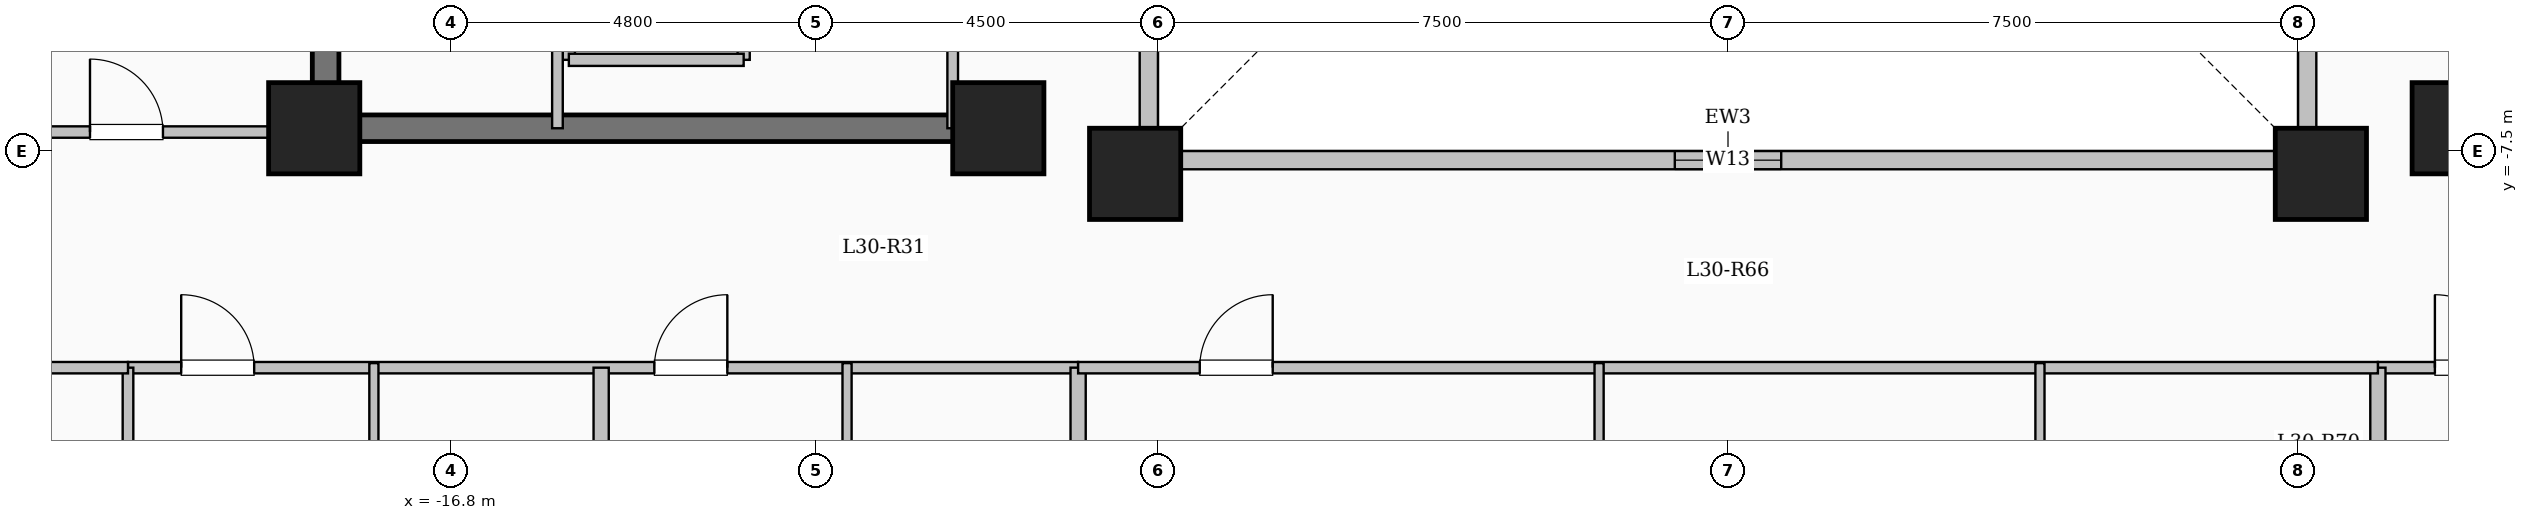
"""IFC4 building model, lengths in metres.
Left out: names, types, materials, properties, quantities, classifications, styles, units other than length and angle.
Written with IfcOpenShell. Run it as: python <this file> out.ifc"""

import sys

from ifc_helpers import new_model, si_unit, direction, frame, frame_2d, origin, origin_2d, place, context, subcontext, project, spatial, rectangle, extrude, element, fill, save


model = new_model("IFC4")
c1 = context("Model", 3, precision=1e-05, world=origin(), true_north=direction((0.0, 1.0)))
c2 = subcontext(c1, "Body", "Model", "MODEL_VIEW")
j1 = project(units=[si_unit("LENGTHUNIT", "METRE"), si_unit("PLANEANGLEUNIT", "RADIAN")], contexts=[c1])
p1 = place(None, origin())
s1 = spatial("IfcSite", under=j1, at=p1, CompositionType="ELEMENT")
p2 = place(p1, origin())
s2 = spatial("IfcBuilding", under=s1, at=p2, CompositionType="ELEMENT")
p3 = place(p2, frame((0.0, 0.0, 111.8)))
s3 = spatial("IfcBuildingStorey", under=s2, at=p3, CompositionType="ELEMENT", Elevation=111.8)
for number, where, z_axis, x_axis in (
    (1, (-7.8, -7.8, 0.0), (0.0, 0.0, 1.0), (1.0, 0.0, 0.0)),
    (2, (7.8, -7.8, 0.0), (0.0, 0.0, 1.0), (1.0, 0.0, 0.0)),
    (3, (-9.6, -7.2, 0.0), (0.0, 0.0, 1.0), (1.0, 0.0, 0.0)),
    (4, (9.6, -7.2, 0.0), (0.0, 0.0, 1.0), (1.0, 0.0, 0.0)),
    (5, (-18.6, -7.2, 0.0), (0.0, 0.0, 1.0), (1.0, 0.0, 0.0)),
):
    element("IfcColumn", number, at=place(p3, frame(where, z_axis=z_axis, x_axis=x_axis)), inside=s3, PredefinedType="COLUMN", context=c2, shape_type="SweptSolid", body=[
        extrude(rectangle(XDim=1.2, YDim=1.2, at=origin_2d()), origin(), (0.0, 0.0, 1.0), 3.35),
    ])
p4 = place(p3, frame((-7.62, -7.62, 0.0), z_axis=(0.0, 0.0, 1.0), x_axis=(1.0, 0.0, 0.0)))
e6 = element("IfcWall", 6, at=p4, inside=s3, PredefinedType="SOLIDWALL", context=c2, shape_type="SweptSolid", body=[
    extrude(rectangle(XDim=15.24, YDim=0.24, at=frame_2d((7.62, 0.0))), origin(), (0.0, 0.0, 1.0), 3.1),
])
p5 = place(p4, frame((6.92, 0.0, 0.95)))
e7 = element("IfcOpeningElement", 7, at=p5, cuts=e6, PredefinedType="OPENING", context=c2, shape_type="SweptSolid", body=[
    extrude(rectangle(XDim=1.4, YDim=1.5, at=frame_2d((0.7, 0.75))), frame((0.0, 0.13, 0.0), z_axis=(0.0, -1.0, 0.0), x_axis=(1.0, 0.0, 0.0)), (0.0, 0.0, 1.0), 0.26),
])
p6 = place(p3, frame((7.62, -7.62, 0.0), z_axis=(0.0, 0.0, 1.0), x_axis=(0.0, 1.0, 0.0)))
e8 = element("IfcWall", 8, at=p6, inside=s3, PredefinedType="SOLIDWALL", context=c2, shape_type="SweptSolid", body=[
    extrude(rectangle(XDim=15.24, YDim=0.24, at=frame_2d((7.62, 0.0))), origin(), (0.0, 0.0, 1.0), 3.1),
])
p7 = place(p6, frame((6.92, 0.0, 0.95)))
e9 = element("IfcOpeningElement", 9, at=p7, cuts=e8, PredefinedType="OPENING", context=c2, shape_type="SweptSolid", body=[
    extrude(rectangle(XDim=1.4, YDim=1.5, at=frame_2d((0.7, 0.75))), frame((0.0, 0.13, 0.0), z_axis=(0.0, -1.0, 0.0), x_axis=(1.0, 0.0, 0.0)), (0.0, 0.0, 1.0), 0.26),
])
p8 = place(p3, frame((-7.62, 7.62, 0.0), z_axis=(0.0, 0.0, 1.0), x_axis=(0.0, -1.0, 0.0)))
e10 = element("IfcWall", 10, at=p8, inside=s3, PredefinedType="SOLIDWALL", context=c2, shape_type="SweptSolid", body=[
    extrude(rectangle(XDim=15.24, YDim=0.24, at=frame_2d((7.62, 0.0))), origin(), (0.0, 0.0, 1.0), 3.1),
])
p9 = place(p8, frame((6.92, 0.0, 0.95)))
e11 = element("IfcOpeningElement", 11, at=p9, cuts=e10, PredefinedType="OPENING", context=c2, shape_type="SweptSolid", body=[
    extrude(rectangle(XDim=1.4, YDim=1.5, at=frame_2d((0.7, 0.75))), frame((0.0, 0.13, 0.0), z_axis=(0.0, -1.0, 0.0), x_axis=(1.0, 0.0, 0.0)), (0.0, 0.0, 1.0), 0.26),
])
for number, where, z_axis, x_axis in (
    (12, (-15.25, -6.3, 0.0), (0.0, 0.0, 1.0), (0.0, 1.0, 0.0)),
    (13, (-12.95, -6.3, 0.0), (0.0, 0.0, 1.0), (0.0, 1.0, 0.0)),
):
    element("IfcWall", number, at=place(p3, frame(where, z_axis=z_axis, x_axis=x_axis)), inside=s3, PredefinedType="SOLIDWALL", context=c2, shape_type="SweptSolid", body=[
        extrude(rectangle(XDim=2.6, YDim=0.16, at=frame_2d((1.3, 0.0))), origin(), (0.0, 0.0, 1.0), 3.1),
    ])
p10 = place(p3, frame((-15.25, -6.3, 0.0), z_axis=(0.0, 0.0, 1.0), x_axis=(1.0, 0.0, 0.0)))
e14 = element("IfcWall", 14, at=p10, inside=s3, PredefinedType="SOLIDWALL", context=c2, shape_type="SweptSolid", body=[
    extrude(rectangle(XDim=2.3, YDim=0.16, at=frame_2d((1.15, 0.0))), origin(), (0.0, 0.0, 1.0), 3.1),
])
p11 = place(p3, frame((-18.45, -7.375, 0.0), z_axis=(0.0, 0.0, 1.0), x_axis=(0.0, 1.0, 0.0)))
e15 = element("IfcWall", 15, at=p11, inside=s3, PredefinedType="SHEAR", context=c2, shape_type="SweptSolid", body=[
    extrude(rectangle(XDim=14.05, YDim=0.35, at=frame_2d((7.025, 0.0))), origin(), (0.0, 0.0, 1.0), 3.35),
])
p12 = place(p3, frame((-18.625, -7.2, 0.0), z_axis=(0.0, 0.0, 1.0), x_axis=(1.0, 0.0, 0.0)))
e16 = element("IfcWall", 16, at=p12, inside=s3, PredefinedType="SHEAR", context=c2, shape_type="SweptSolid", body=[
    extrude(rectangle(XDim=8.55, YDim=0.35, at=frame_2d((4.275, 0.0))), origin(), (0.0, 0.0, 1.0), 3.35),
])
p13 = place(p3, frame((-15.4, -7.2, 0.0), z_axis=(0.0, 0.0, 1.0), x_axis=(0.0, 1.0, 0.0)))
e17 = element("IfcWall", 17, at=p13, inside=s3, PredefinedType="PARTITIONING", context=c2, shape_type="SweptSolid", body=[
    extrude(rectangle(XDim=10.45, YDim=0.14, at=frame_2d((5.225, 0.0))), origin(), (0.0, 0.0, 1.0), 3.1),
])
p14 = place(p13, frame((9.25, 0.0, 0.0)))
e18 = element("IfcOpeningElement", 18, at=p14, cuts=e17, PredefinedType="OPENING", context=c2, shape_type="SweptSolid", body=[
    extrude(rectangle(XDim=0.9, YDim=2.08, at=frame_2d((0.45, 1.04))), frame((0.0, 0.08, 0.0), z_axis=(0.0, -1.0, 0.0), x_axis=(1.0, 0.0, 0.0)), (0.0, 0.0, 1.0), 0.16),
])
p15 = place(p3, frame((-10.2, -7.2, 0.0), z_axis=(0.0, 0.0, 1.0), x_axis=(0.0, 1.0, 0.0)))
e19 = element("IfcWall", 19, at=p15, inside=s3, PredefinedType="PARTITIONING", context=c2, shape_type="SweptSolid", body=[
    extrude(rectangle(XDim=9.12, YDim=0.14, at=frame_2d((4.56, 0.0))), origin(), (0.0, 0.0, 1.0), 3.1),
])
p16 = place(p15, frame((1.9, 0.0, 0.0)))
e20 = element("IfcOpeningElement", 20, at=p16, cuts=e19, PredefinedType="OPENING", context=c2, shape_type="SweptSolid", body=[
    extrude(rectangle(XDim=0.95, YDim=2.12, at=frame_2d((0.475, 1.06))), frame((0.0, 0.08, 0.0), z_axis=(0.0, -1.0, 0.0), x_axis=(1.0, 0.0, 0.0)), (0.0, 0.0, 1.0), 0.16),
])
p17 = place(p15, frame((6.6, 0.0, 0.0)))
e21 = element("IfcOpeningElement", 21, at=p17, cuts=e19, PredefinedType="OPENING", context=c2, shape_type="SweptSolid", body=[
    extrude(rectangle(XDim=0.95, YDim=2.12, at=frame_2d((0.475, 1.06))), frame((0.0, 0.08, 0.0), z_axis=(0.0, -1.0, 0.0), x_axis=(1.0, 0.0, 0.0)), (0.0, 0.0, 1.0), 0.16),
])
p18 = place(p3, frame((-21.05, -10.35, 0.0), z_axis=(0.0, 0.0, 1.0), x_axis=(1.0, 0.0, 0.0)))
e22 = element("IfcWall", 22, at=p18, inside=s3, PredefinedType="PARTITIONING", context=c2, shape_type="SweptSolid", body=[
    extrude(rectangle(XDim=12.5, YDim=0.15, at=frame_2d((6.25, 0.0))), origin(), (0.0, 0.0, 1.0), 3.1),
])
p19 = place(p18, frame((0.7, 0.0, 0.0)))
e23 = element("IfcOpeningElement", 23, at=p19, cuts=e22, PredefinedType="OPENING", context=c2, shape_type="SweptSolid", body=[
    extrude(rectangle(XDim=0.96, YDim=2.15, at=frame_2d((0.48, 1.075))), frame((0.0, 0.085, 0.0), z_axis=(0.0, -1.0, 0.0), x_axis=(1.0, 0.0, 0.0)), (0.0, 0.0, 1.0), 0.17),
])
p20 = place(p18, frame((6.925, 0.0, 0.0)))
e24 = element("IfcOpeningElement", 24, at=p20, cuts=e22, PredefinedType="OPENING", context=c2, shape_type="SweptSolid", body=[
    extrude(rectangle(XDim=0.96, YDim=2.15, at=frame_2d((0.48, 1.075))), frame((0.0, 0.085, 0.0), z_axis=(0.0, -1.0, 0.0), x_axis=(1.0, 0.0, 0.0)), (0.0, 0.0, 1.0), 0.17),
])
p21 = place(p3, frame((8.55, -10.35, 0.0), z_axis=(0.0, 0.0, 1.0), x_axis=(1.0, 0.0, 0.0)))
e25 = element("IfcWall", 25, at=p21, inside=s3, PredefinedType="PARTITIONING", context=c2, shape_type="SweptSolid", body=[
    extrude(rectangle(XDim=12.5, YDim=0.15, at=frame_2d((6.25, 0.0))), origin(), (0.0, 0.0, 1.0), 3.1),
])
p22 = place(p21, frame((0.75, 0.0, 0.0)))
e26 = element("IfcOpeningElement", 26, at=p22, cuts=e25, PredefinedType="OPENING", context=c2, shape_type="SweptSolid", body=[
    extrude(rectangle(XDim=0.96, YDim=2.15, at=frame_2d((0.48, 1.075))), frame((0.0, 0.085, 0.0), z_axis=(0.0, -1.0, 0.0), x_axis=(1.0, 0.0, 0.0)), (0.0, 0.0, 1.0), 0.17),
])
p23 = place(p3, frame((-14.825, -22.1, 0.0), z_axis=(0.0, 0.0, 1.0), x_axis=(0.0, 1.0, 0.0)))
e27 = element("IfcWall", 27, at=p23, inside=s3, PredefinedType="SOLIDWALL", context=c2, shape_type="SweptSolid", body=[
    extrude(rectangle(XDim=11.75, YDim=0.2, at=frame_2d((5.875, 0.0))), origin(), (0.0, 0.0, 1.0), 2.435),
])
p24 = place(p3, frame((-17.815, -13.51, 0.0), z_axis=(0.0, 0.0, 1.0), x_axis=(0.0, 1.0, 0.0)))
e28 = element("IfcWall", 28, at=p24, inside=s3, PredefinedType="PARTITIONING", context=c2, shape_type="SweptSolid", body=[
    extrude(rectangle(XDim=3.22, YDim=0.12, at=frame_2d((1.61, 0.0))), origin(), (0.0, 0.0, 1.0), 3.1),
])
p25 = place(p24, frame((1.14, 0.0, 0.0)))
e29 = element("IfcOpeningElement", 29, at=p25, cuts=e28, PredefinedType="OPENING", context=c2, shape_type="SweptSolid", body=[
    extrude(rectangle(XDim=0.88, YDim=2.1, at=frame_2d((0.44, 1.05))), frame((0.0, 0.07, 0.0), z_axis=(0.0, -1.0, 0.0), x_axis=(1.0, 0.0, 0.0)), (0.0, 0.0, 1.0), 0.14),
])
p26 = place(p3, frame((-11.59, -13.51, 0.0), z_axis=(0.0, 0.0, 1.0), x_axis=(0.0, 1.0, 0.0)))
e30 = element("IfcWall", 30, at=p26, inside=s3, PredefinedType="PARTITIONING", context=c2, shape_type="SweptSolid", body=[
    extrude(rectangle(XDim=3.22, YDim=0.12, at=frame_2d((1.61, 0.0))), origin(), (0.0, 0.0, 1.0), 3.1),
])
p27 = place(p26, frame((1.14, 0.0, 0.0)))
e31 = element("IfcOpeningElement", 31, at=p27, cuts=e30, PredefinedType="OPENING", context=c2, shape_type="SweptSolid", body=[
    extrude(rectangle(XDim=0.88, YDim=2.1, at=frame_2d((0.44, 1.05))), frame((0.0, 0.07, 0.0), z_axis=(0.0, -1.0, 0.0), x_axis=(1.0, 0.0, 0.0)), (0.0, 0.0, 1.0), 0.14),
])
for number, where, z_axis, x_axis in (
    (32, (-8.55, -22.704, 0.0), (0.0, 0.0, 1.0), (0.0, 1.0, 0.0)),
    (33, (8.55, -22.704, 0.0), (0.0, 0.0, 1.0), (0.0, 1.0, 0.0)),
):
    element("IfcWall", number, at=place(p3, frame(where, z_axis=z_axis, x_axis=x_axis)), inside=s3, PredefinedType="SOLIDWALL", context=c2, shape_type="SweptSolid", body=[
        extrude(rectangle(XDim=12.354, YDim=0.2, at=frame_2d((6.177, 0.0))), origin(), (0.0, 0.0, 1.0), 3.1),
    ])
p28 = place(p3, frame((-8.55, -10.35, 0.0), z_axis=(0.0, 0.0, 1.0), x_axis=(1.0, 0.0, 0.0)))
e34 = element("IfcWall", 34, at=p28, inside=s3, PredefinedType="PARTITIONING", context=c2, shape_type="SweptSolid", body=[
    extrude(rectangle(XDim=17.1, YDim=0.15, at=frame_2d((8.55, 0.0))), origin(), (0.0, 0.0, 1.0), 3.1),
])
p29 = place(p28, frame((1.6, 0.0, 0.0)))
e35 = element("IfcOpeningElement", 35, at=p29, cuts=e34, PredefinedType="OPENING", context=c2, shape_type="SweptSolid", body=[
    extrude(rectangle(XDim=0.96, YDim=2.15, at=frame_2d((0.48, 1.075))), frame((0.0, 0.085, 0.0), z_axis=(0.0, -1.0, 0.0), x_axis=(1.0, 0.0, 0.0)), (0.0, 0.0, 1.0), 0.17),
])
p30 = place(p3, frame((-1.696, -23.58, 0.0), z_axis=(0.0, 0.0, 1.0), x_axis=(0.0, 1.0, 0.0)))
e36 = element("IfcWall", 36, at=p30, inside=s3, PredefinedType="PARTITIONING", context=c2, shape_type="SweptSolid", body=[
    extrude(rectangle(XDim=13.29, YDim=0.12, at=frame_2d((6.645, 0.0))), origin(), (0.0, 0.0, 1.0), 3.1),
])
p31 = place(p30, frame((9.465, 0.0, 0.0)))
e37 = element("IfcOpeningElement", 37, at=p31, cuts=e36, PredefinedType="OPENING", context=c2, shape_type="SweptSolid", body=[
    extrude(rectangle(XDim=1.08, YDim=2.15, at=frame_2d((0.54, 1.075))), frame((0.0, 0.07, 0.0), z_axis=(0.0, -1.0, 0.0), x_axis=(1.0, 0.0, 0.0)), (0.0, 0.0, 1.0), 0.14),
])
p32 = place(p3, frame((4.104, -12.75, 0.0), z_axis=(0.0, 0.0, 1.0), x_axis=(0.0, 1.0, 0.0)))
e38 = element("IfcWall", 38, at=p32, inside=s3, PredefinedType="PARTITIONING", context=c2, shape_type="SweptSolid", body=[
    extrude(rectangle(XDim=2.46, YDim=0.12, at=frame_2d((1.23, 0.0))), origin(), (0.0, 0.0, 1.0), 3.1),
])
p33 = place(p3, frame((-26.88, -7.25, 0.0), z_axis=(0.0, 0.0, 1.0), x_axis=(1.0, 0.0, 0.0)))
e39 = element("IfcWall", 39, at=p33, inside=s3, PredefinedType="PARTITIONING", context=c2, shape_type="SweptSolid", body=[
    extrude(rectangle(XDim=8.43, YDim=0.15, at=frame_2d((4.215, 0.0))), origin(), (0.0, 0.0, 1.0), 3.1),
])
p34 = place(p33, frame((5.33, 0.0, 0.0)))
e40 = element("IfcOpeningElement", 40, at=p34, cuts=e39, PredefinedType="OPENING", context=c2, shape_type="SweptSolid", body=[
    extrude(rectangle(XDim=0.96, YDim=2.15, at=frame_2d((0.48, 1.075))), frame((0.0, 0.085, 0.0), z_axis=(0.0, -1.0, 0.0), x_axis=(1.0, 0.0, 0.0)), (0.0, 0.0, 1.0), 0.17),
])
p35 = place(p3, frame((-21.05, -17.85, 0.0), z_axis=(0.0, 0.0, 1.0), x_axis=(0.0, 1.0, 0.0)))
e41 = element("IfcWall", 41, at=p35, inside=s3, PredefinedType="PARTITIONING", context=c2, shape_type="SweptSolid", body=[
    extrude(rectangle(XDim=7.5, YDim=0.14, at=frame_2d((3.75, 0.0))), origin(), (0.0, 0.0, 1.0), 3.1),
])
p36 = place(p3, frame((-26.88, -10.35, 0.0), z_axis=(0.0, 0.0, 1.0), x_axis=(1.0, 0.0, 0.0)))
e42 = element("IfcWall", 42, at=p36, inside=s3, PredefinedType="PARTITIONING", context=c2, shape_type="SweptSolid", body=[
    extrude(rectangle(XDim=5.83, YDim=0.15, at=frame_2d((2.915, 0.0))), origin(), (0.0, 0.0, 1.0), 3.1),
])
p37 = place(p36, frame((2.44, 0.0, 0.0)))
e43 = element("IfcOpeningElement", 43, at=p37, cuts=e42, PredefinedType="OPENING", context=c2, shape_type="SweptSolid", body=[
    extrude(rectangle(XDim=0.95, YDim=2.15, at=frame_2d((0.475, 1.075))), frame((0.0, 0.085, 0.0), z_axis=(0.0, -1.0, 0.0), x_axis=(1.0, 0.0, 0.0)), (0.0, 0.0, 1.0), 0.17),
])
p38 = place(p5, origin())
e44 = element("IfcWindow", 44, at=p38, inside=s3, PartitioningType="SINGLE_PANEL", PredefinedType="WINDOW", context=c2, shape_type="SweptSolid", body=[
    extrude(rectangle(XDim=1.4, YDim=1.5, at=frame_2d((0.7, 0.75))), frame((0.0, 0.03, 0.0), z_axis=(0.0, -1.0, 0.0), x_axis=(1.0, 0.0, 0.0)), (0.0, 0.0, 1.0), 0.06),
])
fill(e7, e44)
p39 = place(p19, origin())
e45 = element("IfcDoor", 45, at=p39, inside=s3, OperationType="SINGLE_SWING_LEFT", PredefinedType="DOOR", context=c2, shape_type="SweptSolid", body=[
    extrude(rectangle(XDim=0.96, YDim=2.15, at=frame_2d((0.48, 1.075))), frame((0.0, 0.025, 0.0), z_axis=(0.0, -1.0, 0.0), x_axis=(1.0, 0.0, 0.0)), (0.0, 0.0, 1.0), 0.05),
])
fill(e23, e45)
p40 = place(p20, origin())
e46 = element("IfcDoor", 46, at=p40, inside=s3, OperationType="SINGLE_SWING_RIGHT", PredefinedType="DOOR", context=c2, shape_type="SweptSolid", body=[
    extrude(rectangle(XDim=0.96, YDim=2.15, at=frame_2d((0.48, 1.075))), frame((0.0, 0.025, 0.0), z_axis=(0.0, -1.0, 0.0), x_axis=(1.0, 0.0, 0.0)), (0.0, 0.0, 1.0), 0.05),
])
fill(e24, e46)
p41 = place(p22, origin())
e47 = element("IfcDoor", 47, at=p41, inside=s3, OperationType="SINGLE_SWING_LEFT", PredefinedType="DOOR", context=c2, shape_type="SweptSolid", body=[
    extrude(rectangle(XDim=0.96, YDim=2.15, at=frame_2d((0.48, 1.075))), frame((0.0, 0.025, 0.0), z_axis=(0.0, -1.0, 0.0), x_axis=(1.0, 0.0, 0.0)), (0.0, 0.0, 1.0), 0.05),
])
fill(e26, e47)
p42 = place(p29, origin())
e48 = element("IfcDoor", 48, at=p42, inside=s3, OperationType="SINGLE_SWING_RIGHT", PredefinedType="DOOR", context=c2, shape_type="SweptSolid", body=[
    extrude(rectangle(XDim=0.96, YDim=2.15, at=frame_2d((0.48, 1.075))), frame((0.0, 0.025, 0.0), z_axis=(0.0, -1.0, 0.0), x_axis=(1.0, 0.0, 0.0)), (0.0, 0.0, 1.0), 0.05),
])
fill(e35, e48)
p43 = place(p34, origin())
e49 = element("IfcDoor", 49, at=p43, inside=s3, OperationType="SINGLE_SWING_LEFT", PredefinedType="DOOR", context=c2, shape_type="SweptSolid", body=[
    extrude(rectangle(XDim=0.96, YDim=2.15, at=frame_2d((0.48, 1.075))), frame((0.0, 0.025, 0.0), z_axis=(0.0, -1.0, 0.0), x_axis=(1.0, 0.0, 0.0)), (0.0, 0.0, 1.0), 0.05),
])
fill(e40, e49)
save(model, sys.argv[1])
